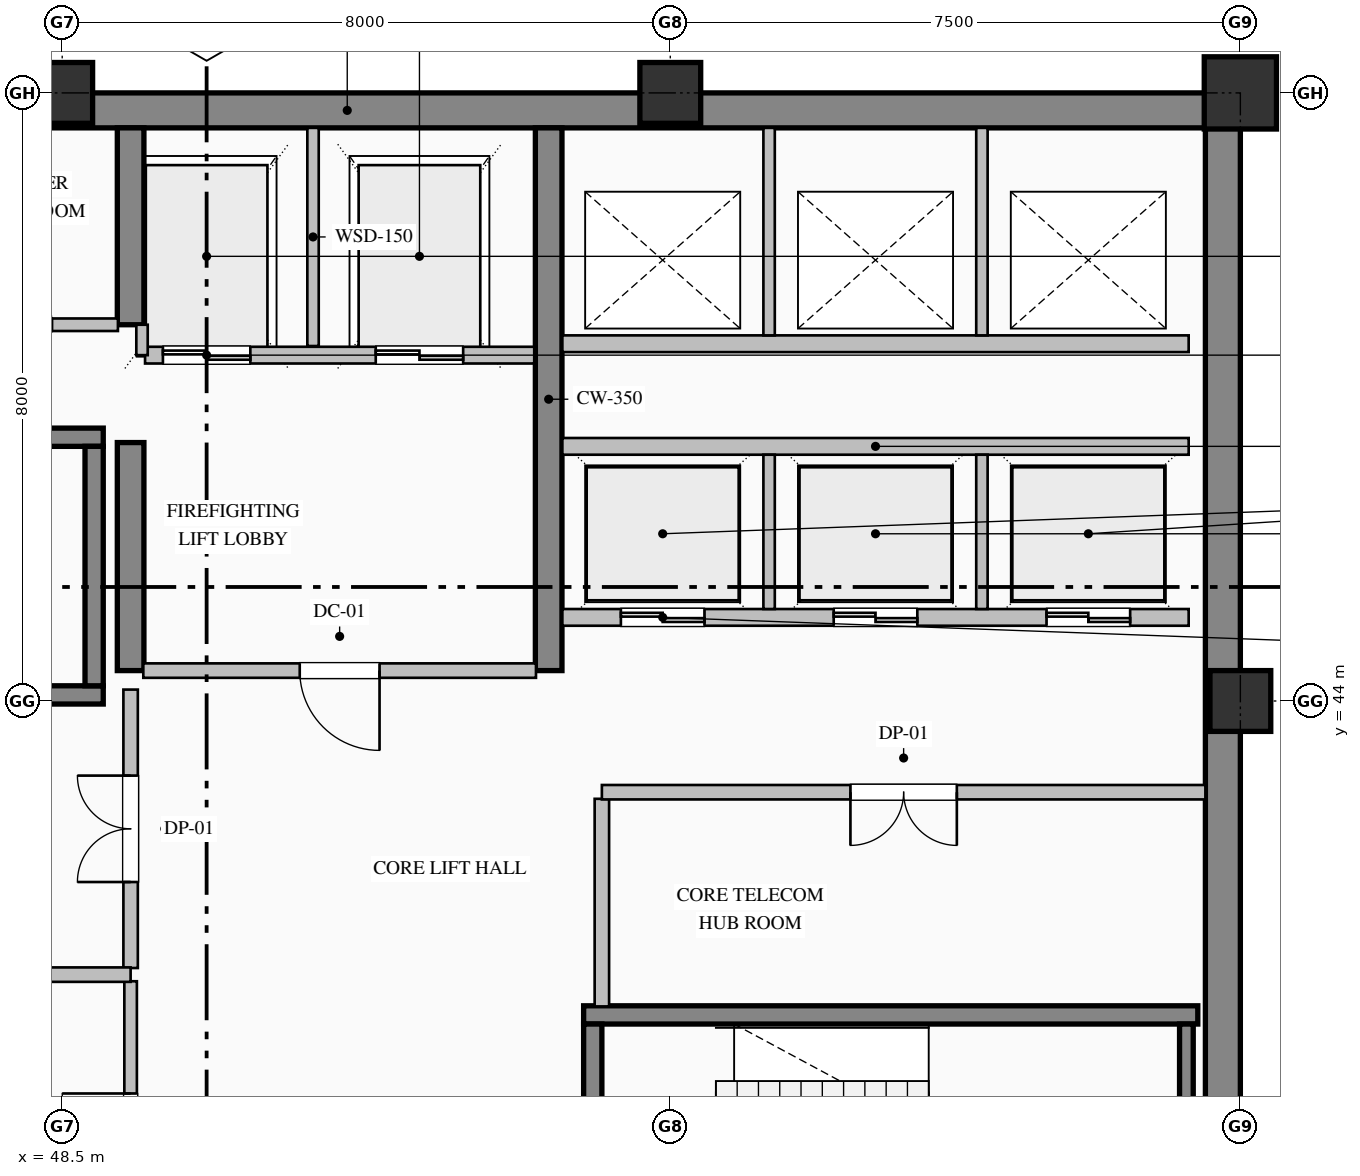
"""IFC4 building model, lengths in metres.
Left out: names, types, materials, properties, quantities, classifications, styles, units other than length and angle.
Written with IfcOpenShell. Run it as: python <this file> out.ifc"""

import sys

from ifc_helpers import new_model, si_unit, direction, frame, frame_2d, origin, origin_2d, place, context, subcontext, project, spatial, rectangle, hollow_rectangle, extrude, element, fill, save


model = new_model("IFC4")
c1 = context("Model", 3, precision=1e-05, world=origin(), true_north=direction((0.0, 1.0)))
c2 = subcontext(c1, "Body", "Model", "MODEL_VIEW")
j1 = project(units=[si_unit("LENGTHUNIT", "METRE"), si_unit("PLANEANGLEUNIT", "RADIAN")], contexts=[c1])
p1 = place(None, origin())
s1 = spatial("IfcSite", under=j1, at=p1, CompositionType="ELEMENT")
p2 = place(p1, origin())
s2 = spatial("IfcBuilding", under=s1, at=p2, CompositionType="ELEMENT")
p3 = place(p2, frame((0.0, 0.0, 237.8)))
s3 = spatial("IfcBuildingStorey", under=s2, at=p3, CompositionType="ELEMENT", Elevation=237.8)
p4 = place(p3, frame((40.5, 51.77, 0.0), z_axis=(0.0, 0.0, 1.0), x_axis=(1.0, 0.0, 0.0)))
e1 = element("IfcWall", 1, at=p4, inside=s3, PredefinedType="SHEAR", context=c2, shape_type="SweptSolid", body=[
    extrude(rectangle(XDim=23.5, YDim=0.46, at=frame_2d((11.75, 0.0))), origin(), (0.0, 0.0, 1.0), 3.775),
])
p5 = place(p3, frame((63.77, 36.32, 0.0), z_axis=(0.0, 0.0, 1.0), x_axis=(0.0, 1.0, 0.0)))
e2 = element("IfcWall", 2, at=p5, inside=s3, PredefinedType="SHEAR", context=c2, shape_type="SweptSolid", body=[
    extrude(rectangle(XDim=15.22, YDim=0.46, at=frame_2d((7.61, 0.0))), origin(), (0.0, 0.0, 1.0), 3.775),
])
p6 = place(p3, frame((49.4, 44.4, 0.0), z_axis=(0.0, 0.0, 1.0), x_axis=(0.0, 1.0, 0.0)))
e3 = element("IfcWall", 3, at=p6, inside=s3, PredefinedType="SHEAR", context=c2, shape_type="SweptSolid", body=[
    extrude(rectangle(XDim=3.0, YDim=0.35, at=frame_2d((1.5, 0.0))), origin(), (0.0, 0.0, 1.0), 3.775),
])
p7 = place(p3, frame((49.4, 48.95, 0.0), z_axis=(0.0, 0.0, 1.0), x_axis=(0.0, 1.0, 0.0)))
e4 = element("IfcWall", 4, at=p7, inside=s3, PredefinedType="SHEAR", context=c2, shape_type="SweptSolid", body=[
    extrude(rectangle(XDim=2.59, YDim=0.35, at=frame_2d((1.295, 0.0))), origin(), (0.0, 0.0, 1.0), 3.775),
])
p8 = place(p3, frame((54.9, 44.4, 0.0), z_axis=(0.0, 0.0, 1.0), x_axis=(0.0, 1.0, 0.0)))
e5 = element("IfcWall", 5, at=p8, inside=s3, PredefinedType="SHEAR", context=c2, shape_type="SweptSolid", body=[
    extrude(rectangle(XDim=7.14, YDim=0.35, at=frame_2d((3.57, 0.0))), origin(), (0.0, 0.0, 1.0), 3.775),
])
for number, where, z_axis, x_axis in (
    (6, (48.5, 52.0, 0.0), (0.0, 0.0, 1.0), (1.0, 0.0, 0.0)),
    (7, (56.5, 52.0, 0.0), (0.0, 0.0, 1.0), (1.0, 0.0, 0.0)),
    (8, (64.0, 44.0, 0.0), (0.0, 0.0, 1.0), (1.0, 0.0, 0.0)),
):
    element("IfcColumn", number, at=place(p3, frame(where, z_axis=z_axis, x_axis=x_axis)), inside=s3, PredefinedType="COLUMN", context=c2, shape_type="SweptSolid", body=[
        extrude(hollow_rectangle(XDim=0.8, YDim=0.8, WallThickness=0.032, at=origin_2d()), origin(), (0.0, 0.0, 1.0), 4.0),
    ])
p9 = place(p3, frame((64.0, 52.0, 0.0), z_axis=(0.0, 0.0, 1.0), x_axis=(1.0, 0.0, 0.0)))
e9 = element("IfcColumn", 9, at=p9, inside=s3, PredefinedType="COLUMN", context=c2, shape_type="SweptSolid", body=[
    extrude(hollow_rectangle(XDim=0.95, YDim=0.95, WallThickness=0.036, at=origin_2d()), origin(), (0.0, 0.0, 1.0), 4.0),
])
for number, where, z_axis, x_axis in (
    (10, (40.96, 47.47, 0.0), (0.0, 0.0, 1.0), (1.0, 0.0, 0.0)),
    (11, (49.04, 44.08, 0.0), (0.0, 0.0, 1.0), (-1.0, 0.0, 0.0)),
):
    element("IfcWall", number, at=place(p3, frame(where, z_axis=z_axis, x_axis=x_axis)), inside=s3, PredefinedType="SOLIDWALL", context=c2, shape_type="SweptSolid", body=[
        extrude(rectangle(XDim=8.08, YDim=0.24, at=frame_2d((4.04, 0.0))), origin(), (0.0, 0.0, 1.0), 4.0),
    ])
p10 = place(p3, frame((48.92, 44.2, 0.0), z_axis=(0.0, 0.0, 1.0), x_axis=(0.0, 1.0, 0.0)))
e12 = element("IfcWall", 12, at=p10, inside=s3, PredefinedType="SOLIDWALL", context=c2, shape_type="SweptSolid", body=[
    extrude(rectangle(XDim=3.15, YDim=0.24, at=frame_2d((1.575, 0.0))), origin(), (0.0, 0.0, 1.0), 4.0),
])
p11 = place(p3, frame((55.36, 39.87, 0.0), z_axis=(0.0, 0.0, 1.0), x_axis=(1.0, 0.0, 0.0)))
e13 = element("IfcWall", 13, at=p11, inside=s3, PredefinedType="SOLIDWALL", context=c2, shape_type="SweptSolid", body=[
    extrude(rectangle(XDim=8.08, YDim=0.24, at=frame_2d((4.04, 0.0))), origin(), (0.0, 0.0, 1.0), 4.0),
])
p12 = place(p3, frame((55.48, 39.75, 0.0), z_axis=(0.0, 0.0, 1.0), x_axis=(0.0, -1.0, 0.0)))
e14 = element("IfcWall", 14, at=p12, inside=s3, PredefinedType="SOLIDWALL", context=c2, shape_type="SweptSolid", body=[
    extrude(rectangle(XDim=3.15, YDim=0.24, at=frame_2d((1.575, 0.0))), origin(), (0.0, 0.0, 1.0), 4.0),
])
p13 = place(p12, frame((1.0, 0.0, 0.0)))
e15 = element("IfcOpeningElement", 15, at=p13, cuts=e14, PredefinedType="OPENING", context=c2, shape_type="SweptSolid", body=[
    extrude(rectangle(XDim=1.15, YDim=2.2, at=frame_2d((0.575, 1.1))), frame((0.0, 0.13, 0.0), z_axis=(0.0, -1.0, 0.0), x_axis=(1.0, 0.0, 0.0)), (0.0, 0.0, 1.0), 0.26),
])
p14 = place(p3, frame((63.29, 36.6, 0.0), z_axis=(0.0, 0.0, 1.0), x_axis=(0.0, 1.0, 0.0)))
e16 = element("IfcWall", 16, at=p14, inside=s3, PredefinedType="SOLIDWALL", context=c2, shape_type="SweptSolid", body=[
    extrude(rectangle(XDim=3.15, YDim=0.18, at=frame_2d((1.575, 0.0))), origin(), (0.0, 0.0, 1.0), 4.0),
])
p15 = place(p3, frame((54.71, 48.55, 0.0), z_axis=(0.0, 0.0, 1.0), x_axis=(-1.0, 0.0, 0.0)))
e17 = element("IfcWall", 17, at=p15, inside=s3, PredefinedType="PARTITIONING", context=c2, shape_type="SweptSolid", body=[
    extrude(rectangle(XDim=5.12, YDim=0.22, at=frame_2d((2.56, 0.0))), origin(), (0.0, 0.0, 1.0), 3.775),
])
p16 = place(p15, frame((3.735, 0.0, 0.0)))
e18 = element("IfcOpeningElement", 18, at=p16, cuts=e17, PredefinedType="OPENING", context=c2, shape_type="SweptSolid", body=[
    extrude(rectangle(XDim=1.15, YDim=2.2, at=frame_2d((0.575, 1.1))), frame((0.0, 0.12, 0.0), z_axis=(0.0, -1.0, 0.0), x_axis=(1.0, 0.0, 0.0)), (0.0, 0.0, 1.0), 0.24),
])
p17 = place(p15, frame((0.935, 0.0, 0.0)))
e19 = element("IfcOpeningElement", 19, at=p17, cuts=e17, PredefinedType="OPENING", context=c2, shape_type="SweptSolid", body=[
    extrude(rectangle(XDim=1.15, YDim=2.2, at=frame_2d((0.575, 1.1))), frame((0.0, 0.12, 0.0), z_axis=(0.0, -1.0, 0.0), x_axis=(1.0, 0.0, 0.0)), (0.0, 0.0, 1.0), 0.24),
])
p18 = place(p3, frame((51.8, 48.67, 0.0), z_axis=(0.0, 0.0, 1.0), x_axis=(0.0, 1.0, 0.0)))
e20 = element("IfcWall", 20, at=p18, inside=s3, PredefinedType="PARTITIONING", context=c2, shape_type="SweptSolid", body=[
    extrude(rectangle(XDim=2.87, YDim=0.15, at=frame_2d((1.435, 0.0))), origin(), (0.0, 0.0, 1.0), 3.775),
])
p19 = place(p3, frame((49.55, 48.55, 0.0), z_axis=(0.0, 0.0, 1.0), x_axis=(0.0, 1.0, 0.0)))
e21 = element("IfcWall", 21, at=p19, inside=s3, PredefinedType="PARTITIONING", context=c2, shape_type="SweptSolid", body=[
    extrude(rectangle(XDim=0.4, YDim=0.15, at=frame_2d((0.2, 0.0))), origin(), (0.0, 0.0, 1.0), 3.775),
])
p20 = place(p3, frame((63.32, 45.1, 0.0), z_axis=(0.0, 0.0, 1.0), x_axis=(-1.0, 0.0, 0.0)))
e22 = element("IfcWall", 22, at=p20, inside=s3, PredefinedType="PARTITIONING", context=c2, shape_type="SweptSolid", body=[
    extrude(rectangle(XDim=8.24, YDim=0.22, at=frame_2d((4.12, 0.0))), origin(), (0.0, 0.0, 1.0), 3.775),
])
p21 = place(p20, frame((6.37, 0.0, 0.0)))
e23 = element("IfcOpeningElement", 23, at=p21, cuts=e22, PredefinedType="OPENING", context=c2, shape_type="SweptSolid", body=[
    extrude(rectangle(XDim=1.1, YDim=2.2, at=frame_2d((0.55, 1.1))), frame((0.0, 0.12, 0.0), z_axis=(0.0, -1.0, 0.0), x_axis=(1.0, 0.0, 0.0)), (0.0, 0.0, 1.0), 0.24),
])
p22 = place(p20, frame((3.57, 0.0, 0.0)))
e24 = element("IfcOpeningElement", 24, at=p22, cuts=e22, PredefinedType="OPENING", context=c2, shape_type="SweptSolid", body=[
    extrude(rectangle(XDim=1.1, YDim=2.2, at=frame_2d((0.55, 1.1))), frame((0.0, 0.12, 0.0), z_axis=(0.0, -1.0, 0.0), x_axis=(1.0, 0.0, 0.0)), (0.0, 0.0, 1.0), 0.24),
])
p23 = place(p20, frame((0.77, 0.0, 0.0)))
e25 = element("IfcOpeningElement", 25, at=p23, cuts=e22, PredefinedType="OPENING", context=c2, shape_type="SweptSolid", body=[
    extrude(rectangle(XDim=1.1, YDim=2.2, at=frame_2d((0.55, 1.1))), frame((0.0, 0.12, 0.0), z_axis=(0.0, -1.0, 0.0), x_axis=(1.0, 0.0, 0.0)), (0.0, 0.0, 1.0), 0.24),
])
p24 = place(p3, frame((55.08, 47.35, 0.0), z_axis=(0.0, 0.0, 1.0), x_axis=(1.0, 0.0, 0.0)))
e26 = element("IfcWall", 26, at=p24, inside=s3, PredefinedType="PARTITIONING", context=c2, shape_type="SweptSolid", body=[
    extrude(rectangle(XDim=8.24, YDim=0.22, at=frame_2d((4.12, 0.0))), origin(), (0.0, 0.0, 1.0), 3.775),
])
for number, where, z_axis, x_axis in (
    (27, (57.8, 45.21, 0.0), (0.0, 0.0, 1.0), (0.0, 1.0, 0.0)),
    (28, (60.6, 45.21, 0.0), (0.0, 0.0, 1.0), (0.0, 1.0, 0.0)),
):
    element("IfcWall", number, at=place(p3, frame(where, z_axis=z_axis, x_axis=x_axis)), inside=s3, PredefinedType="PARTITIONING", context=c2, shape_type="SweptSolid", body=[
        extrude(rectangle(XDim=2.03, YDim=0.15, at=frame_2d((1.015, 0.0))), origin(), (0.0, 0.0, 1.0), 3.775),
    ])
p25 = place(p3, frame((63.32, 48.7, 0.0), z_axis=(0.0, 0.0, 1.0), x_axis=(-1.0, 0.0, 0.0)))
e29 = element("IfcWall", 29, at=p25, inside=s3, PredefinedType="PARTITIONING", context=c2, shape_type="SweptSolid", body=[
    extrude(rectangle(XDim=8.24, YDim=0.22, at=frame_2d((4.12, 0.0))), origin(), (0.0, 0.0, 1.0), 3.775),
])
for number, where, z_axis, x_axis in (
    (30, (57.8, 48.81, 0.0), (0.0, 0.0, 1.0), (0.0, 1.0, 0.0)),
    (31, (60.6, 48.81, 0.0), (0.0, 0.0, 1.0), (0.0, 1.0, 0.0)),
):
    element("IfcWall", number, at=place(p3, frame(where, z_axis=z_axis, x_axis=x_axis)), inside=s3, PredefinedType="PARTITIONING", context=c2, shape_type="SweptSolid", body=[
        extrude(rectangle(XDim=2.73, YDim=0.15, at=frame_2d((1.365, 0.0))), origin(), (0.0, 0.0, 1.0), 3.775),
    ])
p26 = place(p3, frame((46.6, 48.95, 0.0), z_axis=(0.0, 0.0, 1.0), x_axis=(1.0, 0.0, 0.0)))
e32 = element("IfcWall", 32, at=p26, inside=s3, PredefinedType="PARTITIONING", context=c2, shape_type="SweptSolid", body=[
    extrude(rectangle(XDim=2.633, YDim=0.165, at=frame_2d((1.316, 0.0))), origin(), (0.0, 0.0, 1.0), 3.775),
])
p27 = place(p26, frame((0.866, 0.0, 0.0)))
e33 = element("IfcOpeningElement", 33, at=p27, cuts=e32, PredefinedType="OPENING", context=c2, shape_type="SweptSolid", body=[
    extrude(rectangle(XDim=0.9, YDim=2.15, at=frame_2d((0.45, 1.075))), frame((0.0, 0.093, 0.0), z_axis=(0.0, -1.0, 0.0), x_axis=(1.0, 0.0, 0.0)), (0.0, 0.0, 1.0), 0.185),
])
p28 = place(p3, frame((54.733, 44.4, 0.0), z_axis=(0.0, 0.0, 1.0), x_axis=(-1.0, 0.0, 0.0)))
e34 = element("IfcWall", 34, at=p28, inside=s3, PredefinedType="PARTITIONING", context=c2, shape_type="SweptSolid", body=[
    extrude(rectangle(XDim=5.166, YDim=0.19, at=frame_2d((2.583, 0.0))), origin(), (0.0, 0.0, 1.0), 3.775),
])
p29 = place(p28, frame((2.058, 0.0, 0.0)))
e35 = element("IfcOpeningElement", 35, at=p29, cuts=e34, PredefinedType="OPENING", context=c2, shape_type="SweptSolid", body=[
    extrude(rectangle(XDim=1.05, YDim=2.15, at=frame_2d((0.525, 1.075))), frame((0.0, 0.105, 0.0), z_axis=(0.0, -1.0, 0.0), x_axis=(1.0, 0.0, 0.0)), (0.0, 0.0, 1.0), 0.21),
])
p30 = place(p3, frame((49.4, 36.46, 0.0), z_axis=(0.0, 0.0, 1.0), x_axis=(0.0, 1.0, 0.0)))
e36 = element("IfcWall", 36, at=p30, inside=s3, PredefinedType="PARTITIONING", context=c2, shape_type="SweptSolid", body=[
    extrude(rectangle(XDim=3.853, YDim=0.165, at=frame_2d((1.927, 0.0))), origin(), (0.0, 0.0, 1.0), 3.017),
])
p31 = place(p30, frame((1.477, 0.0, 0.0)))
e37 = element("IfcOpeningElement", 37, at=p31, cuts=e36, PredefinedType="OPENING", context=c2, shape_type="SweptSolid", body=[
    extrude(rectangle(XDim=0.9, YDim=2.15, at=frame_2d((0.45, 1.075))), frame((0.0, 0.093, 0.0), z_axis=(0.0, -1.0, 0.0), x_axis=(1.0, 0.0, 0.0)), (0.0, 0.0, 1.0), 0.185),
])
p32 = place(p3, frame((49.4, 40.487, 0.0), z_axis=(0.0, 0.0, 1.0), x_axis=(0.0, 1.0, 0.0)))
e38 = element("IfcWall", 38, at=p32, inside=s3, PredefinedType="PARTITIONING", context=c2, shape_type="SweptSolid", body=[
    extrude(rectangle(XDim=3.663, YDim=0.19, at=frame_2d((1.832, 0.0))), origin(), (0.0, 0.0, 1.0), 3.017),
])
p33 = place(p32, frame((1.132, 0.0, 0.0)))
e39 = element("IfcOpeningElement", 39, at=p33, cuts=e38, PredefinedType="OPENING", context=c2, shape_type="SweptSolid", body=[
    extrude(rectangle(XDim=1.4, YDim=2.25, at=frame_2d((0.7, 1.125))), frame((0.0, 0.105, 0.0), z_axis=(0.0, -1.0, 0.0), x_axis=(1.0, 0.0, 0.0)), (0.0, 0.0, 1.0), 0.21),
])
p34 = place(p3, frame((55.6, 42.713, 0.0), z_axis=(0.0, 0.0, 1.0), x_axis=(0.0, -1.0, 0.0)))
e40 = element("IfcWall", 40, at=p34, inside=s3, PredefinedType="PARTITIONING", context=c2, shape_type="SweptSolid", body=[
    extrude(rectangle(XDim=2.731, YDim=0.19, at=frame_2d((1.365, 0.0))), origin(), (0.0, 0.0, 1.0), 3.775),
])
p35 = place(p3, frame((40.96, 40.4, 0.0), z_axis=(0.0, 0.0, 1.0), x_axis=(1.0, 0.0, 0.0)))
e41 = element("IfcWall", 41, at=p35, inside=s3, PredefinedType="PARTITIONING", context=c2, shape_type="SweptSolid", body=[
    extrude(rectangle(XDim=8.44, YDim=0.19, at=frame_2d((4.22, 0.0))), origin(), (0.0, 0.0, 1.0), 3.775),
])
p36 = place(p3, frame((63.54, 42.8, 0.0), z_axis=(0.0, 0.0, 1.0), x_axis=(-1.0, 0.0, 0.0)))
e42 = element("IfcWall", 42, at=p36, inside=s3, PredefinedType="PARTITIONING", context=c2, shape_type="SweptSolid", body=[
    extrude(rectangle(XDim=7.94, YDim=0.19, at=frame_2d((3.97, 0.0))), origin(), (0.0, 0.0, 1.0), 3.775),
])
p37 = place(p36, frame((3.27, 0.0, 0.0)))
e43 = element("IfcOpeningElement", 43, at=p37, cuts=e42, PredefinedType="OPENING", context=c2, shape_type="SweptSolid", body=[
    extrude(rectangle(XDim=1.4, YDim=2.25, at=frame_2d((0.7, 1.125))), frame((0.0, 0.105, 0.0), z_axis=(0.0, -1.0, 0.0), x_axis=(1.0, 0.0, 0.0)), (0.0, 0.0, 1.0), 0.21),
])
p38 = place(p16, origin())
e44 = element("IfcDoor", 44, at=p38, inside=s3, OperationType="DOUBLE_DOOR_SLIDING", PredefinedType="DOOR", context=c2, shape_type="SweptSolid", body=[
    extrude(rectangle(XDim=1.15, YDim=2.2, at=frame_2d((0.575, 1.1))), frame((0.0, 0.025, 0.0), z_axis=(0.0, -1.0, 0.0), x_axis=(1.0, 0.0, 0.0)), (0.0, 0.0, 1.0), 0.05),
])
fill(e18, e44)
p39 = place(p17, origin())
e45 = element("IfcDoor", 45, at=p39, inside=s3, OperationType="DOUBLE_DOOR_SLIDING", PredefinedType="DOOR", context=c2, shape_type="SweptSolid", body=[
    extrude(rectangle(XDim=1.15, YDim=2.2, at=frame_2d((0.575, 1.1))), frame((0.0, 0.025, 0.0), z_axis=(0.0, -1.0, 0.0), x_axis=(1.0, 0.0, 0.0)), (0.0, 0.0, 1.0), 0.05),
])
fill(e19, e45)
p40 = place(p21, origin())
e46 = element("IfcDoor", 46, at=p40, inside=s3, OperationType="DOUBLE_DOOR_SLIDING", PredefinedType="DOOR", context=c2, shape_type="SweptSolid", body=[
    extrude(rectangle(XDim=1.1, YDim=2.2, at=frame_2d((0.55, 1.1))), frame((0.0, 0.025, 0.0), z_axis=(0.0, -1.0, 0.0), x_axis=(1.0, 0.0, 0.0)), (0.0, 0.0, 1.0), 0.05),
])
fill(e23, e46)
p41 = place(p22, origin())
e47 = element("IfcDoor", 47, at=p41, inside=s3, OperationType="DOUBLE_DOOR_SLIDING", PredefinedType="DOOR", context=c2, shape_type="SweptSolid", body=[
    extrude(rectangle(XDim=1.1, YDim=2.2, at=frame_2d((0.55, 1.1))), frame((0.0, 0.025, 0.0), z_axis=(0.0, -1.0, 0.0), x_axis=(1.0, 0.0, 0.0)), (0.0, 0.0, 1.0), 0.05),
])
fill(e24, e47)
p42 = place(p23, origin())
e48 = element("IfcDoor", 48, at=p42, inside=s3, OperationType="DOUBLE_DOOR_SLIDING", PredefinedType="DOOR", context=c2, shape_type="SweptSolid", body=[
    extrude(rectangle(XDim=1.1, YDim=2.2, at=frame_2d((0.55, 1.1))), frame((0.0, 0.025, 0.0), z_axis=(0.0, -1.0, 0.0), x_axis=(1.0, 0.0, 0.0)), (0.0, 0.0, 1.0), 0.05),
])
fill(e25, e48)
p43 = place(p29, origin())
e49 = element("IfcDoor", 49, at=p43, inside=s3, OperationType="SINGLE_SWING_LEFT", PredefinedType="DOOR", context=c2, shape_type="SweptSolid", body=[
    extrude(rectangle(XDim=1.05, YDim=2.15, at=frame_2d((0.525, 1.075))), frame((0.0, 0.025, 0.0), z_axis=(0.0, -1.0, 0.0), x_axis=(1.0, 0.0, 0.0)), (0.0, 0.0, 1.0), 0.05),
])
fill(e35, e49)
p44 = place(p31, origin())
e50 = element("IfcDoor", 50, at=p44, inside=s3, OperationType="SINGLE_SWING_RIGHT", PredefinedType="DOOR", context=c2, shape_type="SweptSolid", body=[
    extrude(rectangle(XDim=0.9, YDim=2.15, at=frame_2d((0.45, 1.075))), frame((0.0, 0.025, 0.0), z_axis=(0.0, -1.0, 0.0), x_axis=(1.0, 0.0, 0.0)), (0.0, 0.0, 1.0), 0.05),
])
fill(e37, e50)
p45 = place(p33, origin())
e51 = element("IfcDoor", 51, at=p45, inside=s3, OperationType="DOUBLE_DOOR_SINGLE_SWING", PredefinedType="DOOR", context=c2, shape_type="SweptSolid", body=[
    extrude(rectangle(XDim=1.4, YDim=2.25, at=frame_2d((0.7, 1.125))), frame((0.0, 0.025, 0.0), z_axis=(0.0, -1.0, 0.0), x_axis=(1.0, 0.0, 0.0)), (0.0, 0.0, 1.0), 0.05),
])
fill(e39, e51)
p46 = place(p37, origin())
e52 = element("IfcDoor", 52, at=p46, inside=s3, OperationType="DOUBLE_DOOR_SINGLE_SWING", PredefinedType="DOOR", context=c2, shape_type="SweptSolid", body=[
    extrude(rectangle(XDim=1.4, YDim=2.25, at=frame_2d((0.7, 1.125))), frame((0.0, 0.025, 0.0), z_axis=(0.0, -1.0, 0.0), x_axis=(1.0, 0.0, 0.0)), (0.0, 0.0, 1.0), 0.05),
])
fill(e43, e52)
save(model, sys.argv[1])
